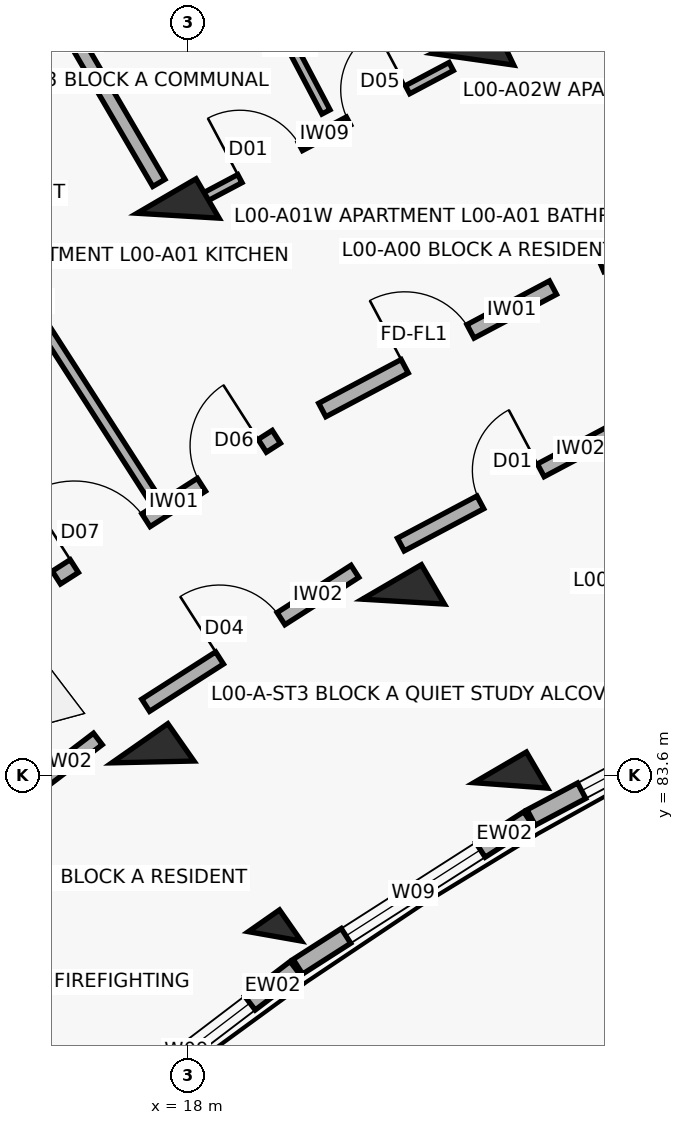
"""IFC4 building model, lengths in metres.
Left out: names, types, materials, properties, quantities, classifications, styles, units other than length and angle.
Written with IfcOpenShell. Run it as: python <this file> out.ifc"""

import sys

from ifc_helpers import new_model, si_unit, direction, frame, frame_2d, origin, origin_2d, place, context, subcontext, project, spatial, rectangle, extrude, element, fill, save


model = new_model("IFC4")
c1 = context("Model", 3, precision=1e-05, world=origin(), true_north=direction((0.0, 1.0)))
c2 = subcontext(c1, "Body", "Model", "MODEL_VIEW")
j1 = project(units=[si_unit("LENGTHUNIT", "METRE"), si_unit("PLANEANGLEUNIT", "RADIAN")], contexts=[c1])
p1 = place(None, origin())
s1 = spatial("IfcSite", under=j1, at=p1, CompositionType="ELEMENT")
p2 = place(p1, origin())
s2 = spatial("IfcBuilding", under=s1, at=p2, CompositionType="ELEMENT")
p3 = place(p2, origin())
s3 = spatial("IfcBuildingStorey", under=s2, at=p3, CompositionType="ELEMENT", Elevation=0.0)
p4 = place(p3, frame((19.146, 81.478, 0.0), z_axis=(0.0, 0.0, 1.0), x_axis=(-0.573004420611, 0.819552276527, 0.0)))
e1 = element("IfcColumn", 1, at=p4, inside=s3, PredefinedType="COLUMN", context=c2, shape_type="SweptSolid", body=[
    extrude(rectangle(XDim=0.5, YDim=0.5, at=origin_2d()), origin(), (0.0, 0.0, 1.0), 4.5),
])
p5 = place(p3, frame((17.542, 83.773, 0.0), z_axis=(0.0, 0.0, 1.0), x_axis=(-0.573004420611, 0.819552276527, 0.0)))
e2 = element("IfcColumn", 2, at=p5, inside=s3, PredefinedType="COLUMN", context=c2, shape_type="SweptSolid", body=[
    extrude(rectangle(XDim=0.6, YDim=0.9, at=origin_2d()), origin(), (0.0, 0.0, 1.0), 4.5),
])
p6 = place(p3, frame((22.249, 83.464, 0.0), z_axis=(0.0, 0.0, 1.0), x_axis=(-0.504226211181, 0.863571611366, 0.0)))
e3 = element("IfcColumn", 3, at=p6, inside=s3, PredefinedType="COLUMN", context=c2, shape_type="SweptSolid", body=[
    extrude(rectangle(XDim=0.55, YDim=0.8, at=origin_2d()), origin(), (0.0, 0.0, 1.0), 4.5),
])
for number, where, z_axis, x_axis in (
    (4, (20.837, 85.882, 0.0), (0.0, 0.0, 1.0), (-0.504, 0.864, 0.0)),
    (5, (17.873, 90.96, 0.0), (0.0, 0.0, 1.0), (-0.504, 0.864, 0.0)),
    (6, (21.754, 93.019, 0.0), (0.0, 0.0, 1.0), (-0.432, 0.902, 0.0)),
):
    element("IfcColumn", number, at=place(p3, frame(where, z_axis=z_axis, x_axis=x_axis)), inside=s3, PredefinedType="COLUMN", context=c2, shape_type="SweptSolid", body=[
        extrude(rectangle(XDim=0.6, YDim=0.9, at=origin_2d()), origin(), (0.0, 0.0, 1.0), 4.5),
    ])
p7 = place(p3, frame((16.55, 78.873, 0.0), z_axis=(0.0, 0.0, 1.0), x_axis=(0.795473707045, 0.605988103349, 0.0)))
e7 = element("IfcWall", 7, at=p7, inside=s3, PredefinedType="SOLIDWALL", context=c2, shape_type="SweptSolid", body=[
    extrude(rectangle(XDim=3.604, YDim=0.23, at=frame_2d((1.802, 0.0))), origin(), (0.0, 0.0, 1.0), 3.45),
])
p8 = place(p7, frame((0.752, 0.0, 0.32)))
e8 = element("IfcOpeningElement", 8, at=p8, cuts=e7, PredefinedType="OPENING", context=c2, shape_type="SweptSolid", body=[
    extrude(rectangle(XDim=2.1, YDim=1.65, at=frame_2d((1.05, 0.825))), frame((0.0, 0.125, 0.0), z_axis=(0.0, -1.0, 0.0), x_axis=(1.0, 0.0, 0.0)), (0.0, 0.0, 1.0), 0.25),
])
p9 = place(p3, frame((19.449, 81.079, 0.0), z_axis=(0.0, 0.0, 1.0), x_axis=(0.84225540507, 0.539078688718, 0.0)))
e9 = element("IfcWall", 9, at=p9, inside=s3, PredefinedType="SOLIDWALL", context=c2, shape_type="SweptSolid", body=[
    extrude(rectangle(XDim=3.604, YDim=0.23, at=frame_2d((1.802, 0.0))), origin(), (0.0, 0.0, 1.0), 3.45),
])
p10 = place(p9, frame((0.752, 0.0, 0.32)))
e10 = element("IfcOpeningElement", 10, at=p10, cuts=e9, PredefinedType="OPENING", context=c2, shape_type="SweptSolid", body=[
    extrude(rectangle(XDim=2.1, YDim=1.65, at=frame_2d((1.05, 0.825))), frame((0.0, 0.125, 0.0), z_axis=(0.0, -1.0, 0.0), x_axis=(1.0, 0.0, 0.0)), (0.0, 0.0, 1.0), 0.25),
])
p11 = place(p3, frame((22.519, 83.042, 0.0), z_axis=(0.0, 0.0, 1.0), x_axis=(0.883438308286, 0.468547495407, 0.0)))
e11 = element("IfcWall", 11, at=p11, inside=s3, PredefinedType="SOLIDWALL", context=c2, shape_type="SweptSolid", body=[
    extrude(rectangle(XDim=3.604, YDim=0.23, at=frame_2d((1.802, 0.0))), origin(), (0.0, 0.0, 1.0), 3.45),
])
p12 = place(p11, frame((0.752, 0.0, 0.32)))
e12 = element("IfcOpeningElement", 12, at=p12, cuts=e11, PredefinedType="OPENING", context=c2, shape_type="SweptSolid", body=[
    extrude(rectangle(XDim=2.1, YDim=1.65, at=frame_2d((1.05, 0.825))), frame((0.0, 0.125, 0.0), z_axis=(0.0, -1.0, 0.0), x_axis=(1.0, 0.0, 0.0)), (0.0, 0.0, 1.0), 0.25),
])
p13 = place(p3, frame((14.329, 82.18, 0.0), z_axis=(0.0, 0.0, 1.0), x_axis=(0.795501577908, 0.605951515838, 0.0)))
e13 = element("IfcWall", 13, at=p13, inside=s3, PredefinedType="SOLIDWALL", context=c2, shape_type="SweptSolid", body=[
    extrude(rectangle(XDim=3.129, YDim=0.19, at=frame_2d((1.564, 0.0))), origin(), (0.0, 0.0, 1.0), 3.34),
])
p14 = place(p13, frame((1.004, 0.0, 0.0)))
e14 = element("IfcOpeningElement", 14, at=p14, cuts=e13, PredefinedType="OPENING", context=c2, shape_type="SweptSolid", body=[
    extrude(rectangle(XDim=1.12, YDim=2.15, at=frame_2d((0.56, 1.075))), frame((0.0, 0.105, 0.0), z_axis=(0.0, -1.0, 0.0), x_axis=(1.0, 0.0, 0.0)), (0.0, 0.0, 1.0), 0.21),
])
p15 = place(p3, frame((16.272, 86.199, 0.0), z_axis=(0.0, 0.0, 1.0), x_axis=(0.842257205985, 0.539075874963, 0.0)))
e15 = element("IfcWall", 15, at=p15, inside=s3, PredefinedType="SOLIDWALL", context=c2, shape_type="SweptSolid", body=[
    extrude(rectangle(XDim=3.436, YDim=0.2, at=frame_2d((1.718, 0.0))), origin(), (0.0, 0.0, 1.0), 3.34),
])
p16 = place(p15, frame((0.28, 0.0, 0.0)))
e16 = element("IfcOpeningElement", 16, at=p16, cuts=e15, PredefinedType="OPENING", context=c2, shape_type="SweptSolid", body=[
    extrude(rectangle(XDim=1.12, YDim=2.15, at=frame_2d((0.56, 1.075))), frame((0.0, 0.11, 0.0), z_axis=(0.0, -1.0, 0.0), x_axis=(1.0, 0.0, 0.0)), (0.0, 0.0, 1.0), 0.22),
])
p17 = place(p15, frame((2.266, 0.0, 0.0)))
e17 = element("IfcOpeningElement", 17, at=p17, cuts=e15, PredefinedType="OPENING", context=c2, shape_type="SweptSolid", body=[
    extrude(rectangle(XDim=0.95, YDim=2.1, at=frame_2d((0.475, 1.05))), frame((0.0, 0.11, 0.0), z_axis=(0.0, -1.0, 0.0), x_axis=(1.0, 0.0, 0.0)), (0.0, 0.0, 1.0), 0.22),
])
p18 = place(p3, frame((17.447, 84.519, 0.0), z_axis=(0.0, 0.0, 1.0), x_axis=(0.842225276846, 0.539125758095, 0.0)))
e18 = element("IfcWall", 18, at=p18, inside=s3, PredefinedType="SOLIDWALL", context=c2, shape_type="SweptSolid", body=[
    extrude(rectangle(XDim=3.269, YDim=0.19, at=frame_2d((1.634, 0.0))), origin(), (0.0, 0.0, 1.0), 3.34),
])
p19 = place(p18, frame((1.154, 0.0, 0.0)))
e19 = element("IfcOpeningElement", 19, at=p19, cuts=e18, PredefinedType="OPENING", context=c2, shape_type="SweptSolid", body=[
    extrude(rectangle(XDim=0.96, YDim=2.1, at=frame_2d((0.48, 1.05))), frame((0.0, 0.105, 0.0), z_axis=(0.0, -1.0, 0.0), x_axis=(1.0, 0.0, 0.0)), (0.0, 0.0, 1.0), 0.21),
])
p20 = place(p3, frame((17.524, 87.288, 0.0), z_axis=(0.0, 0.0, 1.0), x_axis=(-0.540338452216, 0.841447774408, 0.0)))
e20 = element("IfcWall", 20, at=p20, inside=s3, PredefinedType="PARTITIONING", context=c2, shape_type="SweptSolid", body=[
    extrude(rectangle(XDim=7.95, YDim=0.14, at=frame_2d((3.975, 0.0))), origin(), (0.0, 0.0, 1.0), 3.34),
])
p21 = place(p20, frame((6.05, 0.0, 0.0)))
e21 = element("IfcOpeningElement", 21, at=p21, cuts=e20, PredefinedType="OPENING", context=c2, shape_type="SweptSolid", body=[
    extrude(rectangle(XDim=0.92, YDim=2.1, at=frame_2d((0.46, 1.05))), frame((0.0, 0.08, 0.0), z_axis=(0.0, -1.0, 0.0), x_axis=(1.0, 0.0, 0.0)), (0.0, 0.0, 1.0), 0.16),
])
p22 = place(p3, frame((19.77, 88.404, 0.0), z_axis=(0.0, 0.0, 1.0), x_axis=(0.883410853063, 0.468599258099, 0.0)))
e22 = element("IfcWall", 22, at=p22, inside=s3, PredefinedType="SOLIDWALL", context=c2, shape_type="SweptSolid", body=[
    extrude(rectangle(XDim=3.436, YDim=0.2, at=frame_2d((1.718, 0.0))), origin(), (0.0, 0.0, 1.0), 3.34),
])
p23 = place(p22, frame((1.228, 0.0, 0.0)))
e23 = element("IfcOpeningElement", 23, at=p23, cuts=e22, PredefinedType="OPENING", context=c2, shape_type="SweptSolid", body=[
    extrude(rectangle(XDim=0.98, YDim=2.15, at=frame_2d((0.49, 1.075))), frame((0.0, 0.11, 0.0), z_axis=(0.0, -1.0, 0.0), x_axis=(1.0, 0.0, 0.0)), (0.0, 0.0, 1.0), 0.22),
])
p24 = place(p3, frame((20.804, 86.634, 0.0), z_axis=(0.0, 0.0, 1.0), x_axis=(0.883444301944, 0.468536194293, 0.0)))
e24 = element("IfcWall", 24, at=p24, inside=s3, PredefinedType="SOLIDWALL", context=c2, shape_type="SweptSolid", body=[
    extrude(rectangle(XDim=3.269, YDim=0.19, at=frame_2d((1.634, 0.0))), origin(), (0.0, 0.0, 1.0), 3.34),
])
p25 = place(p24, frame((1.184, 0.0, 0.0)))
e25 = element("IfcOpeningElement", 25, at=p25, cuts=e24, PredefinedType="OPENING", context=c2, shape_type="SweptSolid", body=[
    extrude(rectangle(XDim=0.9, YDim=2.1, at=frame_2d((0.45, 1.05))), frame((0.0, 0.105, 0.0), z_axis=(0.0, -1.0, 0.0), x_axis=(1.0, 0.0, 0.0)), (0.0, 0.0, 1.0), 0.21),
])
p26 = place(p3, frame((18.113, 91.144, 0.0), z_axis=(0.0, 0.0, 1.0), x_axis=(0.88341855112, 0.46858474531, 0.0)))
e26 = element("IfcWall", 26, at=p26, inside=s3, PredefinedType="PARTITIONING", context=c2, shape_type="SweptSolid", body=[
    extrude(rectangle(XDim=3.797, YDim=0.12, at=frame_2d((1.898, 0.0))), origin(), (0.0, 0.0, 1.0), 3.34),
])
p27 = place(p26, frame((0.65, 0.0, 0.0)))
e27 = element("IfcOpeningElement", 27, at=p27, cuts=e26, PredefinedType="OPENING", context=c2, shape_type="SweptSolid", body=[
    extrude(rectangle(XDim=0.9, YDim=2.1, at=frame_2d((0.45, 1.05))), frame((0.0, 0.07, 0.0), z_axis=(0.0, -1.0, 0.0), x_axis=(1.0, 0.0, 0.0)), (0.0, 0.0, 1.0), 0.14),
])
p28 = place(p26, frame((2.267, 0.0, 0.0)))
e28 = element("IfcOpeningElement", 28, at=p28, cuts=e26, PredefinedType="OPENING", context=c2, shape_type="SweptSolid", body=[
    extrude(rectangle(XDim=0.88, YDim=2.1, at=frame_2d((0.44, 1.05))), frame((0.0, 0.07, 0.0), z_axis=(0.0, -1.0, 0.0), x_axis=(1.0, 0.0, 0.0)), (0.0, 0.0, 1.0), 0.14),
])
p29 = place(p3, frame((19.819, 92.326, 0.0), z_axis=(0.0, 0.0, 1.0), x_axis=(-0.465849102717, 0.884864177995, 0.0)))
e29 = element("IfcWall", 29, at=p29, inside=s3, PredefinedType="PARTITIONING", context=c2, shape_type="SweptSolid", body=[
    extrude(rectangle(XDim=4.9, YDim=0.12, at=frame_2d((2.45, 0.0))), origin(), (0.0, 0.0, 1.0), 3.34),
])
p30 = place(p29, frame((2.025, 0.0, 0.0)))
e30 = element("IfcOpeningElement", 30, at=p30, cuts=e29, PredefinedType="OPENING", context=c2, shape_type="SweptSolid", body=[
    extrude(rectangle(XDim=0.85, YDim=2.1, at=frame_2d((0.425, 1.05))), frame((0.0, 0.07, 0.0), z_axis=(0.0, -1.0, 0.0), x_axis=(1.0, 0.0, 0.0)), (0.0, 0.0, 1.0), 0.14),
])
p31 = place(p3, frame((17.621, 91.392, 0.0), z_axis=(0.0, 0.0, 1.0), x_axis=(-0.504216452091, 0.863577309475, 0.0)))
e31 = element("IfcWall", 31, at=p31, inside=s3, PredefinedType="SOLIDWALL", context=c2, shape_type="SweptSolid", body=[
    extrude(rectangle(XDim=4.35, YDim=0.185, at=frame_2d((2.175, 0.0))), origin(), (0.0, 0.0, 1.0), 3.34),
])
p32 = place(p3, frame((23.437, 90.316, 0.0), z_axis=(0.0, 0.0, 1.0), x_axis=(0.918718172399, 0.394913813008, 0.0)))
e32 = element("IfcWall", 32, at=p32, inside=s3, PredefinedType="SOLIDWALL", context=c2, shape_type="SweptSolid", body=[
    extrude(rectangle(XDim=3.436, YDim=0.2, at=frame_2d((1.718, 0.0))), origin(), (0.0, 0.0, 1.0), 3.34),
])
p33 = place(p32, frame((1.208, 0.0, 0.0)))
e33 = element("IfcOpeningElement", 33, at=p33, cuts=e32, PredefinedType="OPENING", context=c2, shape_type="SweptSolid", body=[
    extrude(rectangle(XDim=1.02, YDim=2.15, at=frame_2d((0.51, 1.075))), frame((0.0, 0.11, 0.0), z_axis=(0.0, -1.0, 0.0), x_axis=(1.0, 0.0, 0.0)), (0.0, 0.0, 1.0), 0.22),
])
p34 = place(p8, origin())
e34 = element("IfcWindow", 34, at=p34, inside=s3, PartitioningType="TRIPLE_PANEL_VERTICAL", PredefinedType="WINDOW", context=c2, shape_type="SweptSolid", body=[
    extrude(rectangle(XDim=2.1, YDim=1.65, at=frame_2d((1.05, 0.825))), frame((0.0, 0.03, 0.0), z_axis=(0.0, -1.0, 0.0), x_axis=(1.0, 0.0, 0.0)), (0.0, 0.0, 1.0), 0.06),
])
fill(e8, e34)
p35 = place(p10, origin())
e35 = element("IfcWindow", 35, at=p35, inside=s3, PartitioningType="TRIPLE_PANEL_VERTICAL", PredefinedType="WINDOW", context=c2, shape_type="SweptSolid", body=[
    extrude(rectangle(XDim=2.1, YDim=1.65, at=frame_2d((1.05, 0.825))), frame((0.0, 0.03, 0.0), z_axis=(0.0, -1.0, 0.0), x_axis=(1.0, 0.0, 0.0)), (0.0, 0.0, 1.0), 0.06),
])
fill(e10, e35)
p36 = place(p12, origin())
e36 = element("IfcWindow", 36, at=p36, inside=s3, PartitioningType="TRIPLE_PANEL_VERTICAL", PredefinedType="WINDOW", context=c2, shape_type="SweptSolid", body=[
    extrude(rectangle(XDim=2.1, YDim=1.65, at=frame_2d((1.05, 0.825))), frame((0.0, 0.03, 0.0), z_axis=(0.0, -1.0, 0.0), x_axis=(1.0, 0.0, 0.0)), (0.0, 0.0, 1.0), 0.06),
])
fill(e12, e36)
p37 = place(p16, origin())
e37 = element("IfcDoor", 37, at=p37, inside=s3, OperationType="SINGLE_SWING_LEFT", PredefinedType="DOOR", context=c2, shape_type="SweptSolid", body=[
    extrude(rectangle(XDim=1.12, YDim=2.15, at=frame_2d((0.56, 1.075))), frame((0.0, 0.025, 0.0), z_axis=(0.0, -1.0, 0.0), x_axis=(1.0, 0.0, 0.0)), (0.0, 0.0, 1.0), 0.05),
])
fill(e16, e37)
p38 = place(p17, origin())
e38 = element("IfcDoor", 38, at=p38, inside=s3, OperationType="SINGLE_SWING_RIGHT", PredefinedType="DOOR", context=c2, shape_type="SweptSolid", body=[
    extrude(rectangle(XDim=0.95, YDim=2.1, at=frame_2d((0.475, 1.05))), frame((0.0, 0.025, 0.0), z_axis=(0.0, -1.0, 0.0), x_axis=(1.0, 0.0, 0.0)), (0.0, 0.0, 1.0), 0.05),
])
fill(e17, e38)
p39 = place(p19, origin())
e39 = element("IfcDoor", 39, at=p39, inside=s3, OperationType="SINGLE_SWING_LEFT", PredefinedType="DOOR", context=c2, shape_type="SweptSolid", body=[
    extrude(rectangle(XDim=0.96, YDim=2.1, at=frame_2d((0.48, 1.05))), frame((0.0, 0.025, 0.0), z_axis=(0.0, -1.0, 0.0), x_axis=(1.0, 0.0, 0.0)), (0.0, 0.0, 1.0), 0.05),
])
fill(e19, e39)
p40 = place(p23, origin())
e40 = element("IfcDoor", 40, at=p40, inside=s3, OperationType="SINGLE_SWING_LEFT", PredefinedType="DOOR", context=c2, shape_type="SweptSolid", body=[
    extrude(rectangle(XDim=0.98, YDim=2.15, at=frame_2d((0.49, 1.075))), frame((0.0, 0.025, 0.0), z_axis=(0.0, -1.0, 0.0), x_axis=(1.0, 0.0, 0.0)), (0.0, 0.0, 1.0), 0.05),
])
fill(e23, e40)
p41 = place(p25, origin())
e41 = element("IfcDoor", 41, at=p41, inside=s3, OperationType="SINGLE_SWING_RIGHT", PredefinedType="DOOR", context=c2, shape_type="SweptSolid", body=[
    extrude(rectangle(XDim=0.9, YDim=2.1, at=frame_2d((0.45, 1.05))), frame((0.0, 0.025, 0.0), z_axis=(0.0, -1.0, 0.0), x_axis=(1.0, 0.0, 0.0)), (0.0, 0.0, 1.0), 0.05),
])
fill(e25, e41)
p42 = place(p27, origin())
e42 = element("IfcDoor", 42, at=p42, inside=s3, OperationType="SINGLE_SWING_LEFT", PredefinedType="DOOR", context=c2, shape_type="SweptSolid", body=[
    extrude(rectangle(XDim=0.9, YDim=2.1, at=frame_2d((0.45, 1.05))), frame((0.0, 0.025, 0.0), z_axis=(0.0, -1.0, 0.0), x_axis=(1.0, 0.0, 0.0)), (0.0, 0.0, 1.0), 0.05),
])
fill(e27, e42)
p43 = place(p28, origin())
e43 = element("IfcDoor", 43, at=p43, inside=s3, OperationType="SINGLE_SWING_RIGHT", PredefinedType="DOOR", context=c2, shape_type="SweptSolid", body=[
    extrude(rectangle(XDim=0.88, YDim=2.1, at=frame_2d((0.44, 1.05))), frame((0.0, 0.025, 0.0), z_axis=(0.0, -1.0, 0.0), x_axis=(1.0, 0.0, 0.0)), (0.0, 0.0, 1.0), 0.05),
])
fill(e28, e43)
save(model, sys.argv[1])
